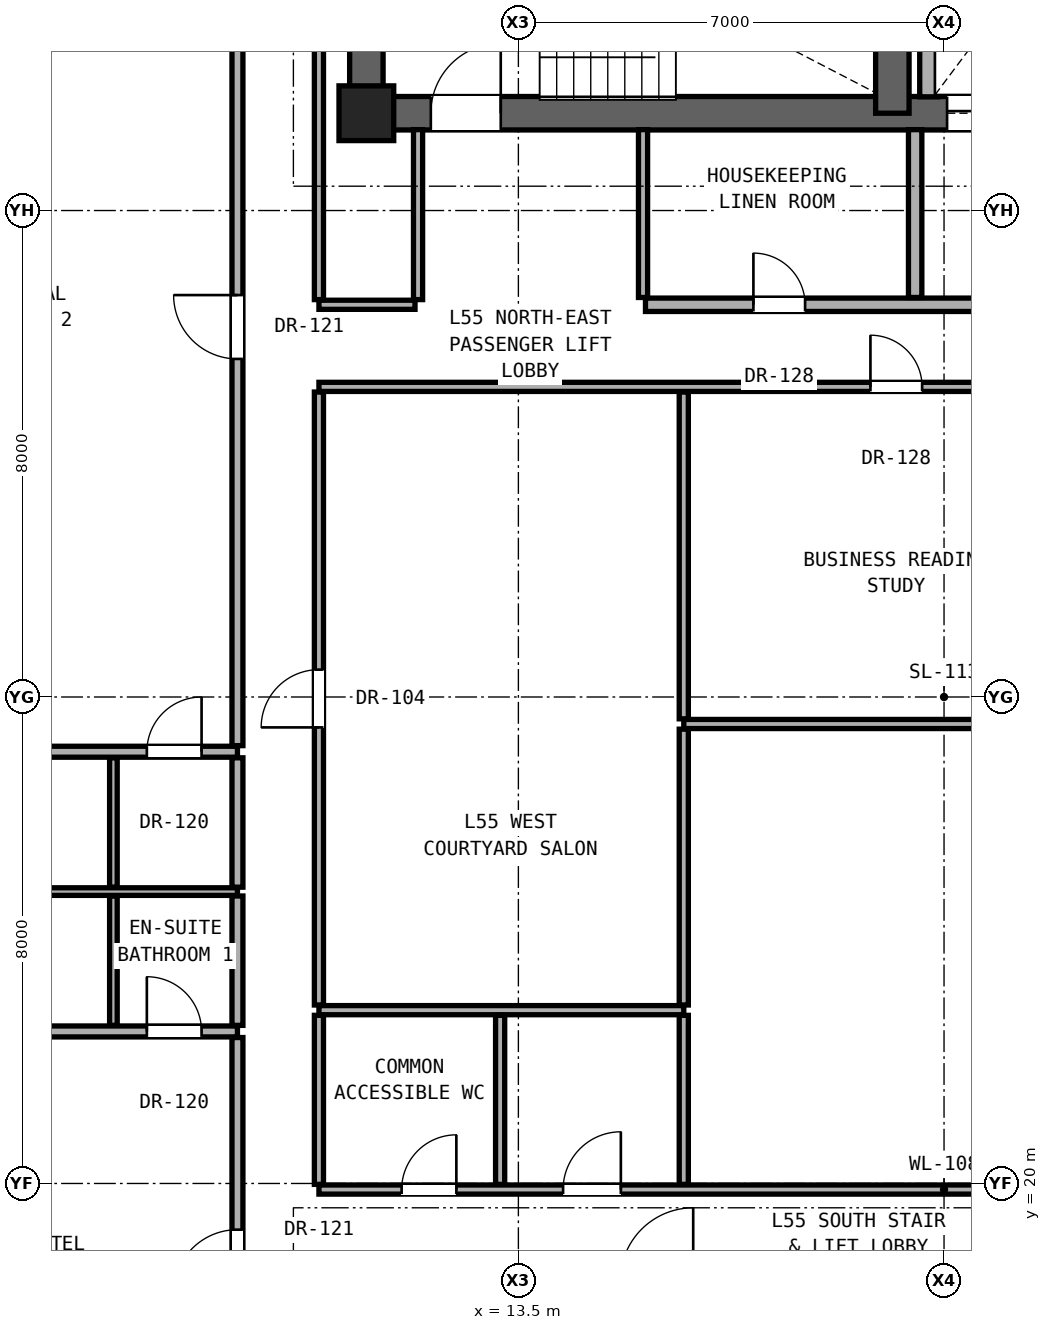
"""IFC4 building model, lengths in metres.
Left out: names, types, materials, properties, quantities, classifications, styles, units other than length and angle.
Written with IfcOpenShell. Run it as: python <this file> out.ifc"""

import sys

from ifc_helpers import new_model, si_unit, direction, frame, frame_2d, origin, origin_2d, place, context, subcontext, project, spatial, rectangle, extrude, element, fill, save


model = new_model("IFC4")
c1 = context("Model", 3, precision=1e-05, world=origin(), true_north=direction((0.0, 1.0)))
c2 = subcontext(c1, "Body", "Model", "MODEL_VIEW")
j1 = project(units=[si_unit("LENGTHUNIT", "METRE"), si_unit("PLANEANGLEUNIT", "RADIAN")], contexts=[c1])
p1 = place(None, origin())
s1 = spatial("IfcSite", under=j1, at=p1, CompositionType="ELEMENT")
p2 = place(p1, origin())
s2 = spatial("IfcBuilding", under=s1, at=p2, CompositionType="ELEMENT")
p3 = place(p2, frame((0.0, 0.0, 193.4)))
s3 = spatial("IfcBuildingStorey", under=s2, at=p3, CompositionType="ELEMENT", Elevation=193.4)
p4 = place(p3, frame((11.0, 37.6, 0.0), z_axis=(0.0, 0.0, 1.0), x_axis=(1.0, 0.0, 0.0)))
e1 = element("IfcColumn", 1, at=p4, inside=s3, PredefinedType="COLUMN", context=c2, shape_type="SweptSolid", body=[
    extrude(rectangle(XDim=0.9, YDim=0.9, at=origin_2d()), origin(), (0.0, 0.0, 1.0), 3.25),
])
p5 = place(p3, frame((11.0, 37.6, 0.0), z_axis=(0.0, 0.0, 1.0), x_axis=(0.0, 1.0, 0.0)))
e2 = element("IfcWall", 2, at=p5, inside=s3, PredefinedType="SHEAR", context=c2, shape_type="SweptSolid", body=[
    extrude(rectangle(XDim=6.0, YDim=0.55, at=frame_2d((3.0, 0.0))), origin(), (0.0, 0.0, 1.0), 3.05),
])
p6 = place(p3, frame((11.0, 37.6, 0.0), z_axis=(0.0, 0.0, 1.0), x_axis=(1.0, 0.0, 0.0)))
e3 = element("IfcWall", 3, at=p6, inside=s3, PredefinedType="SHEAR", context=c2, shape_type="SweptSolid", body=[
    extrude(rectangle(XDim=19.0, YDim=0.55, at=frame_2d((9.5, 0.0))), origin(), (0.0, 0.0, 1.0), 3.05),
])
p7 = place(p6, frame((1.06, 0.0, 0.0)))
e4 = element("IfcOpeningElement", 4, at=p7, cuts=e3, PredefinedType="OPENING", context=c2, shape_type="SweptSolid", body=[
    extrude(rectangle(XDim=1.15, YDim=2.2, at=frame_2d((0.575, 1.1))), frame((0.0, 0.285, 0.0), z_axis=(0.0, -1.0, 0.0), x_axis=(1.0, 0.0, 0.0)), (0.0, 0.0, 1.0), 0.57),
])
p8 = place(p6, frame((9.55, 0.0, 0.0)))
e5 = element("IfcOpeningElement", 5, at=p8, cuts=e3, PredefinedType="OPENING", context=c2, shape_type="SweptSolid", body=[
    extrude(rectangle(XDim=1.4, YDim=2.35, at=frame_2d((0.7, 1.175))), frame((0.0, 0.285, 0.0), z_axis=(0.0, -1.0, 0.0), x_axis=(1.0, 0.0, 0.0)), (0.0, 0.0, 1.0), 0.57),
])
p9 = place(p6, frame((11.95, 0.0, 0.0)))
e6 = element("IfcOpeningElement", 6, at=p9, cuts=e3, PredefinedType="OPENING", context=c2, shape_type="SweptSolid", body=[
    extrude(rectangle(XDim=1.4, YDim=2.35, at=frame_2d((0.7, 1.175))), frame((0.0, 0.285, 0.0), z_axis=(0.0, -1.0, 0.0), x_axis=(1.0, 0.0, 0.0)), (0.0, 0.0, 1.0), 0.57),
])
p10 = place(p3, frame((19.65, 37.6, 0.0), z_axis=(0.0, 0.0, 1.0), x_axis=(0.0, 1.0, 0.0)))
e7 = element("IfcWall", 7, at=p10, inside=s3, PredefinedType="SHEAR", context=c2, shape_type="SweptSolid", body=[
    extrude(rectangle(XDim=3.443, YDim=0.55, at=frame_2d((1.721, 0.0))), origin(), (0.0, 0.0, 1.0), 3.05),
])
p11 = place(p3, frame((10.22, 19.9, 0.0), z_axis=(0.0, 0.0, 1.0), x_axis=(1.0, 0.0, 0.0)))
e8 = element("IfcWall", 8, at=p11, inside=s3, PredefinedType="PARTITIONING", context=c2, shape_type="SweptSolid", body=[
    extrude(rectangle(XDim=20.56, YDim=0.15, at=frame_2d((10.28, 0.0))), origin(), (0.0, 0.0, 1.0), 2.186),
])
p12 = place(p11, frame((1.36, 0.0, 0.0)))
e9 = element("IfcOpeningElement", 9, at=p12, cuts=e8, PredefinedType="OPENING", context=c2, shape_type="SweptSolid", body=[
    extrude(rectangle(XDim=0.9, YDim=2.1, at=frame_2d((0.45, 1.05))), frame((0.0, 0.085, 0.0), z_axis=(0.0, -1.0, 0.0), x_axis=(1.0, 0.0, 0.0)), (0.0, 0.0, 1.0), 0.17),
])
p13 = place(p11, frame((4.015, 0.0, 0.0)))
e10 = element("IfcOpeningElement", 10, at=p13, cuts=e8, PredefinedType="OPENING", context=c2, shape_type="SweptSolid", body=[
    extrude(rectangle(XDim=0.95, YDim=2.15, at=frame_2d((0.475, 1.075))), frame((0.0, 0.085, 0.0), z_axis=(0.0, -1.0, 0.0), x_axis=(1.0, 0.0, 0.0)), (0.0, 0.0, 1.0), 0.17),
])
p14 = place(p11, frame((12.835, 0.0, 0.0)))
e11 = element("IfcOpeningElement", 11, at=p14, cuts=e8, PredefinedType="OPENING", context=c2, shape_type="SweptSolid", body=[
    extrude(rectangle(XDim=0.85, YDim=2.01, at=frame_2d((0.425, 1.005))), frame((0.0, 0.085, 0.0), z_axis=(0.0, -1.0, 0.0), x_axis=(1.0, 0.0, 0.0)), (0.0, 0.0, 1.0), 0.17),
])
p15 = place(p3, frame((0.33, 22.5, 0.0), z_axis=(0.0, 0.0, 1.0), x_axis=(1.0, 0.0, 0.0)))
e12 = element("IfcWall", 12, at=p15, inside=s3, PredefinedType="PARTITIONING", context=c2, shape_type="SweptSolid", body=[
    extrude(rectangle(XDim=8.55, YDim=0.18, at=frame_2d((4.275, 0.0))), origin(), (0.0, 0.0, 1.0), 2.269),
])
p16 = place(p15, frame((2.8, 0.0, 0.0)))
e13 = element("IfcOpeningElement", 13, at=p16, cuts=e12, PredefinedType="OPENING", context=c2, shape_type="SweptSolid", body=[
    extrude(rectangle(XDim=0.95, YDim=2.15, at=frame_2d((0.475, 1.075))), frame((0.0, 0.1, 0.0), z_axis=(0.0, -1.0, 0.0), x_axis=(1.0, 0.0, 0.0)), (0.0, 0.0, 1.0), 0.2),
])
p17 = place(p15, frame((7.06, 0.0, 0.0)))
e14 = element("IfcOpeningElement", 14, at=p17, cuts=e12, PredefinedType="OPENING", context=c2, shape_type="SweptSolid", body=[
    extrude(rectangle(XDim=0.9, YDim=2.1, at=frame_2d((0.45, 1.05))), frame((0.0, 0.1, 0.0), z_axis=(0.0, -1.0, 0.0), x_axis=(1.0, 0.0, 0.0)), (0.0, 0.0, 1.0), 0.2),
])
p18 = place(p3, frame((10.22, 22.85, 0.0), z_axis=(0.0, 0.0, 1.0), x_axis=(1.0, 0.0, 0.0)))
e15 = element("IfcWall", 15, at=p18, inside=s3, PredefinedType="PARTITIONING", context=c2, shape_type="SweptSolid", body=[
    extrude(rectangle(XDim=6.0, YDim=0.15, at=frame_2d((3.0, 0.0))), origin(), (0.0, 0.0, 1.0), 2.186),
])
p19 = place(p3, frame((0.33, 24.8, 0.0), z_axis=(0.0, 0.0, 1.0), x_axis=(1.0, 0.0, 0.0)))
e16 = element("IfcWall", 16, at=p19, inside=s3, PredefinedType="PARTITIONING", context=c2, shape_type="SweptSolid", body=[
    extrude(rectangle(XDim=8.55, YDim=0.125, at=frame_2d((4.275, 0.0))), origin(), (0.0, 0.0, 1.0), 2.269),
])
p20 = place(p3, frame((0.33, 27.1, 0.0), z_axis=(0.0, 0.0, 1.0), x_axis=(1.0, 0.0, 0.0)))
e17 = element("IfcWall", 17, at=p20, inside=s3, PredefinedType="PARTITIONING", context=c2, shape_type="SweptSolid", body=[
    extrude(rectangle(XDim=8.55, YDim=0.18, at=frame_2d((4.275, 0.0))), origin(), (0.0, 0.0, 1.0), 2.269),
])
p21 = place(p20, frame((2.8, 0.0, 0.0)))
e18 = element("IfcOpeningElement", 18, at=p21, cuts=e17, PredefinedType="OPENING", context=c2, shape_type="SweptSolid", body=[
    extrude(rectangle(XDim=0.95, YDim=2.15, at=frame_2d((0.475, 1.075))), frame((0.0, 0.1, 0.0), z_axis=(0.0, -1.0, 0.0), x_axis=(1.0, 0.0, 0.0)), (0.0, 0.0, 1.0), 0.2),
])
p22 = place(p20, frame((7.06, 0.0, 0.0)))
e19 = element("IfcOpeningElement", 19, at=p22, cuts=e17, PredefinedType="OPENING", context=c2, shape_type="SweptSolid", body=[
    extrude(rectangle(XDim=0.9, YDim=2.1, at=frame_2d((0.45, 1.05))), frame((0.0, 0.1, 0.0), z_axis=(0.0, -1.0, 0.0), x_axis=(1.0, 0.0, 0.0)), (0.0, 0.0, 1.0), 0.2),
])
p23 = place(p3, frame((16.22, 27.556, 0.0), z_axis=(0.0, 0.0, 1.0), x_axis=(1.0, 0.0, 0.0)))
e20 = element("IfcWall", 20, at=p23, inside=s3, PredefinedType="PARTITIONING", context=c2, shape_type="SweptSolid", body=[
    extrude(rectangle(XDim=14.56, YDim=0.15, at=frame_2d((7.28, 0.0))), origin(), (0.0, 0.0, 1.0), 2.186),
])
p24 = place(p3, frame((10.22, 33.1, 0.0), z_axis=(0.0, 0.0, 1.0), x_axis=(1.0, 0.0, 0.0)))
e21 = element("IfcWall", 21, at=p24, inside=s3, PredefinedType="PARTITIONING", context=c2, shape_type="SweptSolid", body=[
    extrude(rectangle(XDim=20.56, YDim=0.15, at=frame_2d((10.28, 0.0))), origin(), (0.0, 0.0, 1.0), 2.186),
])
p25 = place(p24, frame((9.07, 0.0, 0.0)))
e22 = element("IfcOpeningElement", 22, at=p25, cuts=e21, PredefinedType="OPENING", context=c2, shape_type="SweptSolid", body=[
    extrude(rectangle(XDim=0.85, YDim=2.01, at=frame_2d((0.425, 1.005))), frame((0.0, 0.085, 0.0), z_axis=(0.0, -1.0, 0.0), x_axis=(1.0, 0.0, 0.0)), (0.0, 0.0, 1.0), 0.17),
])
p26 = place(p24, frame((16.33, 0.0, 0.0)))
e23 = element("IfcOpeningElement", 23, at=p26, cuts=e21, PredefinedType="OPENING", context=c2, shape_type="SweptSolid", body=[
    extrude(rectangle(XDim=0.85, YDim=2.01, at=frame_2d((0.425, 1.005))), frame((0.0, 0.085, 0.0), z_axis=(0.0, -1.0, 0.0), x_axis=(1.0, 0.0, 0.0)), (0.0, 0.0, 1.0), 0.17),
])
p27 = place(p3, frame((10.22, 34.45, 0.0), z_axis=(0.0, 0.0, 1.0), x_axis=(1.0, 0.0, 0.0)))
e24 = element("IfcWall", 24, at=p27, inside=s3, PredefinedType="PARTITIONING", context=c2, shape_type="SweptSolid", body=[
    extrude(rectangle(XDim=1.58, YDim=0.15, at=frame_2d((0.79, 0.0))), origin(), (0.0, 0.0, 1.0), 2.186),
])
p28 = place(p3, frame((15.59, 34.45, 0.0), z_axis=(0.0, 0.0, 1.0), x_axis=(1.0, 0.0, 0.0)))
e25 = element("IfcWall", 25, at=p28, inside=s3, PredefinedType="SOLIDWALL", context=c2, shape_type="SweptSolid", body=[
    extrude(rectangle(XDim=15.19, YDim=0.22, at=frame_2d((7.595, 0.0))), origin(), (0.0, 0.0, 1.0), 2.186),
])
p29 = place(p28, frame((6.435, 0.0, 0.0)))
e26 = element("IfcOpeningElement", 26, at=p29, cuts=e25, PredefinedType="OPENING", context=c2, shape_type="SweptSolid", body=[
    extrude(rectangle(XDim=0.85, YDim=2.01, at=frame_2d((0.425, 1.005))), frame((0.0, 0.12, 0.0), z_axis=(0.0, -1.0, 0.0), x_axis=(1.0, 0.0, 0.0)), (0.0, 0.0, 1.0), 0.24),
])
p30 = place(p28, frame((11.085, 0.0, 0.0)))
e27 = element("IfcOpeningElement", 27, at=p30, cuts=e25, PredefinedType="OPENING", context=c2, shape_type="SweptSolid", body=[
    extrude(rectangle(XDim=0.95, YDim=2.15, at=frame_2d((0.475, 1.075))), frame((0.0, 0.12, 0.0), z_axis=(0.0, -1.0, 0.0), x_axis=(1.0, 0.0, 0.0)), (0.0, 0.0, 1.0), 0.24),
])
p31 = place(p28, frame((1.775, 0.0, 0.0)))
e28 = element("IfcOpeningElement", 28, at=p31, cuts=e25, PredefinedType="OPENING", context=c2, shape_type="SweptSolid", body=[
    extrude(rectangle(XDim=0.85, YDim=2.01, at=frame_2d((0.425, 1.005))), frame((0.0, 0.12, 0.0), z_axis=(0.0, -1.0, 0.0), x_axis=(1.0, 0.0, 0.0)), (0.0, 0.0, 1.0), 0.24),
])
for number, where, z_axis, x_axis in (
    (29, (6.84, 22.6, 0.0), (0.0, 0.0, 1.0), (0.0, 1.0, 0.0)),
    (30, (6.84, 24.873, 0.0), (0.0, 0.0, 1.0), (0.0, 1.0, 0.0)),
):
    element("IfcWall", number, at=place(p3, frame(where, z_axis=z_axis, x_axis=x_axis)), inside=s3, PredefinedType="PARTITIONING", context=c2, shape_type="SweptSolid", body=[
        extrude(rectangle(XDim=2.127, YDim=0.125, at=frame_2d((1.064, 0.0))), origin(), (0.0, 0.0, 1.0), 2.346),
    ])
p32 = place(p3, frame((8.88, 15.031, 0.0), z_axis=(0.0, 0.0, 1.0), x_axis=(0.0, 1.0, 0.0)))
e31 = element("IfcWall", 31, at=p32, inside=s3, PredefinedType="PARTITIONING", context=c2, shape_type="SweptSolid", body=[
    extrude(rectangle(XDim=7.369, YDim=0.18, at=frame_2d((3.685, 0.0))), origin(), (0.0, 0.0, 1.0), 2.442),
])
p33 = place(p32, frame((3.159, 0.0, 0.0)))
e32 = element("IfcOpeningElement", 32, at=p33, cuts=e31, PredefinedType="OPENING", context=c2, shape_type="SweptSolid", body=[
    extrude(rectangle(XDim=1.05, YDim=2.2, at=frame_2d((0.525, 1.1))), frame((0.0, 0.1, 0.0), z_axis=(0.0, -1.0, 0.0), x_axis=(1.0, 0.0, 0.0)), (0.0, 0.0, 1.0), 0.2),
])
for number, where, z_axis, x_axis in (
    (33, (8.88, 22.6, 0.0), (0.0, 0.0, 1.0), (0.0, 1.0, 0.0)),
    (34, (8.88, 24.873, 0.0), (0.0, 0.0, 1.0), (0.0, 1.0, 0.0)),
):
    element("IfcWall", number, at=place(p3, frame(where, z_axis=z_axis, x_axis=x_axis)), inside=s3, PredefinedType="PARTITIONING", context=c2, shape_type="SweptSolid", body=[
        extrude(rectangle(XDim=2.127, YDim=0.18, at=frame_2d((1.064, 0.0))), origin(), (0.0, 0.0, 1.0), 2.346),
    ])
p34 = place(p3, frame((8.88, 27.2, 0.0), z_axis=(0.0, 0.0, 1.0), x_axis=(0.0, 1.0, 0.0)))
e35 = element("IfcWall", 35, at=p34, inside=s3, PredefinedType="PARTITIONING", context=c2, shape_type="SweptSolid", body=[
    extrude(rectangle(XDim=13.769, YDim=0.18, at=frame_2d((6.885, 0.0))), origin(), (0.0, 0.0, 1.0), 2.346),
])
p35 = place(p34, frame((6.36, 0.0, 0.0)))
e36 = element("IfcOpeningElement", 36, at=p35, cuts=e35, PredefinedType="OPENING", context=c2, shape_type="SweptSolid", body=[
    extrude(rectangle(XDim=1.05, YDim=2.2, at=frame_2d((0.525, 1.1))), frame((0.0, 0.1, 0.0), z_axis=(0.0, -1.0, 0.0), x_axis=(1.0, 0.0, 0.0)), (0.0, 0.0, 1.0), 0.2),
])
p36 = place(p3, frame((10.22, 19.985, 0.0), z_axis=(0.0, 0.0, 1.0), x_axis=(0.0, 1.0, 0.0)))
e37 = element("IfcWall", 37, at=p36, inside=s3, PredefinedType="PARTITIONING", context=c2, shape_type="SweptSolid", body=[
    extrude(rectangle(XDim=2.78, YDim=0.15, at=frame_2d((1.39, 0.0))), origin(), (0.0, 0.0, 1.0), 3.05),
])
p37 = place(p3, frame((10.22, 22.935, 0.0), z_axis=(0.0, 0.0, 1.0), x_axis=(0.0, 1.0, 0.0)))
e38 = element("IfcWall", 38, at=p37, inside=s3, PredefinedType="PARTITIONING", context=c2, shape_type="SweptSolid", body=[
    extrude(rectangle(XDim=10.08, YDim=0.15, at=frame_2d((5.04, 0.0))), origin(), (0.0, 0.0, 1.0), 2.346),
])
p38 = place(p37, frame((4.565, 0.0, 0.0)))
e39 = element("IfcOpeningElement", 39, at=p38, cuts=e38, PredefinedType="OPENING", context=c2, shape_type="SweptSolid", body=[
    extrude(rectangle(XDim=0.95, YDim=2.15, at=frame_2d((0.475, 1.075))), frame((0.0, 0.085, 0.0), z_axis=(0.0, -1.0, 0.0), x_axis=(1.0, 0.0, 0.0)), (0.0, 0.0, 1.0), 0.17),
])
p39 = place(p3, frame((10.22, 34.535, 0.0), z_axis=(0.0, 0.0, 1.0), x_axis=(0.0, 1.0, 0.0)))
e40 = element("IfcWall", 40, at=p39, inside=s3, PredefinedType="PARTITIONING", context=c2, shape_type="SweptSolid", body=[
    extrude(rectangle(XDim=9.13, YDim=0.15, at=frame_2d((4.565, 0.0))), origin(), (0.0, 0.0, 1.0), 2.442),
])
p40 = place(p3, frame((11.85, 34.535, 0.0), z_axis=(0.0, 0.0, 1.0), x_axis=(0.0, 1.0, 0.0)))
e41 = element("IfcWall", 41, at=p40, inside=s3, PredefinedType="PARTITIONING", context=c2, shape_type="SweptSolid", body=[
    extrude(rectangle(XDim=2.795, YDim=0.15, at=frame_2d((1.397, 0.0))), origin(), (0.0, 0.0, 1.0), 3.05),
])
p41 = place(p3, frame((13.2, 19.985, 0.0), z_axis=(0.0, 0.0, 1.0), x_axis=(0.0, 1.0, 0.0)))
e42 = element("IfcWall", 42, at=p41, inside=s3, PredefinedType="PARTITIONING", context=c2, shape_type="SweptSolid", body=[
    extrude(rectangle(XDim=2.78, YDim=0.15, at=frame_2d((1.39, 0.0))), origin(), (0.0, 0.0, 1.0), 3.05),
])
p42 = place(p3, frame((15.55, 34.57, 0.0), z_axis=(0.0, 0.0, 1.0), x_axis=(0.0, 1.0, 0.0)))
e43 = element("IfcWall", 43, at=p42, inside=s3, PredefinedType="PARTITIONING", context=c2, shape_type="SweptSolid", body=[
    extrude(rectangle(XDim=2.76, YDim=0.15, at=frame_2d((1.38, 0.0))), origin(), (0.0, 0.0, 1.0), 3.05),
])
p43 = place(p3, frame((16.22, 19.985, 0.0), z_axis=(0.0, 0.0, 1.0), x_axis=(0.0, 1.0, 0.0)))
e44 = element("IfcWall", 44, at=p43, inside=s3, PredefinedType="PARTITIONING", context=c2, shape_type="SweptSolid", body=[
    extrude(rectangle(XDim=2.78, YDim=0.15, at=frame_2d((1.39, 0.0))), origin(), (0.0, 0.0, 1.0), 3.05),
])
p44 = place(p3, frame((16.22, 22.935, 0.0), z_axis=(0.0, 0.0, 1.0), x_axis=(0.0, 1.0, 0.0)))
e45 = element("IfcWall", 45, at=p44, inside=s3, PredefinedType="PARTITIONING", context=c2, shape_type="SweptSolid", body=[
    extrude(rectangle(XDim=4.536, YDim=0.15, at=frame_2d((2.268, 0.0))), origin(), (0.0, 0.0, 1.0), 2.186),
])
p45 = place(p3, frame((16.22, 27.641, 0.0), z_axis=(0.0, 0.0, 1.0), x_axis=(0.0, 1.0, 0.0)))
e46 = element("IfcWall", 46, at=p45, inside=s3, PredefinedType="PARTITIONING", context=c2, shape_type="SweptSolid", body=[
    extrude(rectangle(XDim=5.374, YDim=0.15, at=frame_2d((2.687, 0.0))), origin(), (0.0, 0.0, 1.0), 2.186),
])
p46 = place(p3, frame((20.025, 34.57, 0.0), z_axis=(0.0, 0.0, 1.0), x_axis=(0.0, 1.0, 0.0)))
e47 = element("IfcWall", 47, at=p46, inside=s3, PredefinedType="SOLIDWALL", context=c2, shape_type="SweptSolid", body=[
    extrude(rectangle(XDim=2.76, YDim=0.22, at=frame_2d((1.38, 0.0))), origin(), (0.0, 0.0, 1.0), 3.05),
])
p47 = place(p3, frame((20.25, 37.87, 0.0), z_axis=(0.0, 0.0, 1.0), x_axis=(0.0, 1.0, 0.0)))
e48 = element("IfcWall", 48, at=p47, inside=s3, PredefinedType="SOLIDWALL", context=c2, shape_type="SweptSolid", body=[
    extrude(rectangle(XDim=2.37, YDim=0.3, at=frame_2d((1.185, 0.0))), origin(), (0.0, 0.0, 1.0), 3.05),
])
p48 = place(p7, origin())
e49 = element("IfcDoor", 49, at=p48, inside=s3, OperationType="SINGLE_SWING_RIGHT", PredefinedType="DOOR", context=c2, shape_type="SweptSolid", body=[
    extrude(rectangle(XDim=1.15, YDim=2.2, at=frame_2d((0.575, 1.1))), frame((0.0, 0.025, 0.0), z_axis=(0.0, -1.0, 0.0), x_axis=(1.0, 0.0, 0.0)), (0.0, 0.0, 1.0), 0.05),
])
fill(e4, e49)
p49 = place(p31, origin())
e50 = element("IfcDoor", 50, at=p49, inside=s3, OperationType="SINGLE_SWING_LEFT", PredefinedType="DOOR", context=c2, shape_type="SweptSolid", body=[
    extrude(rectangle(XDim=0.85, YDim=2.01, at=frame_2d((0.425, 1.005))), frame((0.0, 0.025, 0.0), z_axis=(0.0, -1.0, 0.0), x_axis=(1.0, 0.0, 0.0)), (0.0, 0.0, 1.0), 0.05),
])
fill(e28, e50)
p50 = place(p12, origin())
e51 = element("IfcDoor", 51, at=p50, inside=s3, OperationType="SINGLE_SWING_RIGHT", PredefinedType="DOOR", context=c2, shape_type="SweptSolid", body=[
    extrude(rectangle(XDim=0.9, YDim=2.1, at=frame_2d((0.45, 1.05))), frame((0.0, 0.025, 0.0), z_axis=(0.0, -1.0, 0.0), x_axis=(1.0, 0.0, 0.0)), (0.0, 0.0, 1.0), 0.05),
])
fill(e9, e51)
p51 = place(p33, origin())
e52 = element("IfcDoor", 52, at=p51, inside=s3, OperationType="SINGLE_SWING_LEFT", PredefinedType="DOOR", context=c2, shape_type="SweptSolid", body=[
    extrude(rectangle(XDim=1.05, YDim=2.2, at=frame_2d((0.525, 1.1))), frame((0.0, 0.025, 0.0), z_axis=(0.0, -1.0, 0.0), x_axis=(1.0, 0.0, 0.0)), (0.0, 0.0, 1.0), 0.05),
])
fill(e32, e52)
p52 = place(p17, origin())
e53 = element("IfcDoor", 53, at=p52, inside=s3, OperationType="SINGLE_SWING_LEFT", PredefinedType="DOOR", context=c2, shape_type="SweptSolid", body=[
    extrude(rectangle(XDim=0.9, YDim=2.1, at=frame_2d((0.45, 1.05))), frame((0.0, 0.025, 0.0), z_axis=(0.0, -1.0, 0.0), x_axis=(1.0, 0.0, 0.0)), (0.0, 0.0, 1.0), 0.05),
])
fill(e14, e53)
p53 = place(p35, origin())
e54 = element("IfcDoor", 54, at=p53, inside=s3, OperationType="SINGLE_SWING_RIGHT", PredefinedType="DOOR", context=c2, shape_type="SweptSolid", body=[
    extrude(rectangle(XDim=1.05, YDim=2.2, at=frame_2d((0.525, 1.1))), frame((0.0, 0.025, 0.0), z_axis=(0.0, -1.0, 0.0), x_axis=(1.0, 0.0, 0.0)), (0.0, 0.0, 1.0), 0.05),
])
fill(e36, e54)
p54 = place(p22, origin())
e55 = element("IfcDoor", 55, at=p54, inside=s3, OperationType="SINGLE_SWING_RIGHT", PredefinedType="DOOR", context=c2, shape_type="SweptSolid", body=[
    extrude(rectangle(XDim=0.9, YDim=2.1, at=frame_2d((0.45, 1.05))), frame((0.0, 0.025, 0.0), z_axis=(0.0, -1.0, 0.0), x_axis=(1.0, 0.0, 0.0)), (0.0, 0.0, 1.0), 0.05),
])
fill(e19, e55)
p55 = place(p13, origin())
e56 = element("IfcDoor", 56, at=p55, inside=s3, OperationType="SINGLE_SWING_RIGHT", PredefinedType="DOOR", context=c2, shape_type="SweptSolid", body=[
    extrude(rectangle(XDim=0.95, YDim=2.15, at=frame_2d((0.475, 1.075))), frame((0.0, 0.025, 0.0), z_axis=(0.0, -1.0, 0.0), x_axis=(1.0, 0.0, 0.0)), (0.0, 0.0, 1.0), 0.05),
])
fill(e10, e56)
p56 = place(p38, origin())
e57 = element("IfcDoor", 57, at=p56, inside=s3, OperationType="SINGLE_SWING_LEFT", PredefinedType="DOOR", context=c2, shape_type="SweptSolid", body=[
    extrude(rectangle(XDim=0.95, YDim=2.15, at=frame_2d((0.475, 1.075))), frame((0.0, 0.025, 0.0), z_axis=(0.0, -1.0, 0.0), x_axis=(1.0, 0.0, 0.0)), (0.0, 0.0, 1.0), 0.05),
])
fill(e39, e57)
p57 = place(p25, origin())
e58 = element("IfcDoor", 58, at=p57, inside=s3, OperationType="SINGLE_SWING_LEFT", PredefinedType="DOOR", context=c2, shape_type="SweptSolid", body=[
    extrude(rectangle(XDim=0.85, YDim=2.01, at=frame_2d((0.425, 1.005))), frame((0.0, 0.025, 0.0), z_axis=(0.0, -1.0, 0.0), x_axis=(1.0, 0.0, 0.0)), (0.0, 0.0, 1.0), 0.05),
])
fill(e22, e58)
p58 = place(p8, origin())
e59 = element("IfcDoor", 59, at=p58, inside=s3, OperationType="DOUBLE_DOOR_SLIDING", PredefinedType="DOOR", context=c2, shape_type="SweptSolid", body=[
    extrude(rectangle(XDim=1.4, YDim=2.35, at=frame_2d((0.7, 1.175))), frame((0.0, 0.025, 0.0), z_axis=(0.0, -1.0, 0.0), x_axis=(1.0, 0.0, 0.0)), (0.0, 0.0, 1.0), 0.05),
])
fill(e5, e59)
save(model, sys.argv[1])
